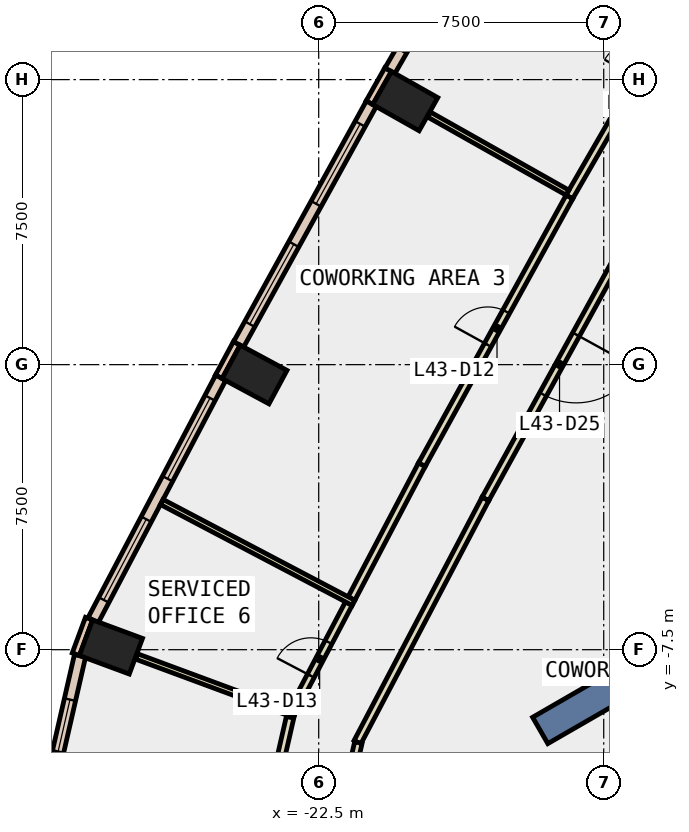
"""IFC4 building model, lengths in metres.
Left out: names, types, materials, properties, quantities, classifications, styles, units other than length and angle.
Written with IfcOpenShell. Run it as: python <this file> out.ifc"""

import sys

from ifc_helpers import new_model, si_unit, direction, frame, frame_2d, origin, origin_2d, place, context, subcontext, project, spatial, rectangle, extrude, element, fill, save


model = new_model("IFC4")
c1 = context("Model", 3, precision=1e-05, world=origin(), true_north=direction((0.0, 1.0)))
c2 = subcontext(c1, "Body", "Model", "MODEL_VIEW")
j1 = project(units=[si_unit("LENGTHUNIT", "METRE"), si_unit("PLANEANGLEUNIT", "RADIAN")], contexts=[c1])
p1 = place(None, origin())
s1 = spatial("IfcSite", under=j1, at=p1, CompositionType="ELEMENT")
p2 = place(p1, origin())
s2 = spatial("IfcBuilding", under=s1, at=p2, CompositionType="ELEMENT")
p3 = place(p2, frame((0.0, 0.0, 194.0)))
s3 = spatial("IfcBuildingStorey", under=s2, at=p3, CompositionType="ELEMENT", Elevation=194.0)
for number, where, z_axis, x_axis in (
    (1, (-20.222, 6.934, -0.4), (0.0, 0.0, 1.0), (0.491, 0.871, 0.0)),
    (2, (-24.188, -0.259, -0.4), (0.0, 0.0, 1.0), (0.474, 0.88, 0.0)),
    (3, (-27.967, -7.429, -0.4), (0.0, 0.0, 1.0), (0.347, 0.938, 0.0)),
):
    element("IfcColumn", number, at=place(p3, frame(where, z_axis=z_axis, x_axis=x_axis)), inside=s3, PredefinedType="COLUMN", context=c2, shape_type="SweptSolid", body=[
        extrude(rectangle(XDim=1.0, YDim=1.4, at=origin_2d()), origin(), (0.0, 0.0, 1.0), 4.2),
    ])
p4 = place(p3, frame((-8.877, -5.125, -0.4), z_axis=(0.0, 0.0, 1.0), x_axis=(-0.866017533419, -0.500013631625, 0.0)))
e4 = element("IfcWall", 4, at=p4, inside=s3, PredefinedType="SHEAR", context=c2, shape_type="SweptSolid", body=[
    extrude(rectangle(XDim=9.0, YDim=0.8, at=frame_2d((4.5, 0.0))), origin(), (0.0, 0.0, 1.0), 4.2),
])
p5 = place(p3, frame((-20.673, 7.762, 0.0), z_axis=(0.0, 0.0, 1.0), x_axis=(-0.491848119507, -0.870681013539, 0.0)))
e5 = element("IfcWall", 5, at=p5, inside=s3, PredefinedType="STANDARD", context=c2, shape_type="SweptSolid", body=[
    extrude(rectangle(XDim=1.0, YDim=0.2, at=frame_2d((0.5, 0.0))), origin(), (0.0, 0.0, 1.0), 3.8),
])
p6 = place(p3, frame((-24.655, 0.561, 0.0), z_axis=(0.0, 0.0, 1.0), x_axis=(-0.473663196434, -0.88070606694, 0.0)))
e6 = element("IfcWall", 6, at=p6, inside=s3, PredefinedType="STANDARD", context=c2, shape_type="SweptSolid", body=[
    extrude(rectangle(XDim=1.0, YDim=0.2, at=frame_2d((0.5, 0.0))), origin(), (0.0, 0.0, 1.0), 3.8),
])
p7 = place(p3, frame((-28.544, -6.683, 0.0), z_axis=(0.0, 0.0, 1.0), x_axis=(-0.347107644204, -0.937825294677, 0.0)))
e7 = element("IfcWall", 7, at=p7, inside=s3, PredefinedType="STANDARD", context=c2, shape_type="SweptSolid", body=[
    extrude(rectangle(XDim=1.0, YDim=0.2, at=frame_2d((0.5, 0.0))), origin(), (0.0, 0.0, 1.0), 3.8),
])
p8 = place(p3, frame((-17.011, 13.996, 0.0), z_axis=(0.0, 0.0, 1.0), x_axis=(-0.499948481376, -0.866055146033, 0.0)))
e8 = element("IfcWall", 8, at=p8, inside=s3, PredefinedType="STANDARD", context=c2, shape_type="SweptSolid", body=[
    extrude(rectangle(XDim=7.231, YDim=0.3, at=frame_2d((3.615, 0.0))), origin(), (0.0, 0.0, 1.0), 3.8),
])
p9 = place(p8, frame((0.608, 0.0, 0.9)))
e9 = element("IfcOpeningElement", 9, at=p9, cuts=e8, PredefinedType="OPENING", context=c2, shape_type="SweptSolid", body=[
    extrude(rectangle(XDim=2.4, YDim=2.6, at=frame_2d((1.2, 1.3))), frame((0.0, 0.16, 0.0), z_axis=(0.0, -1.0, 0.0), x_axis=(1.0, 0.0, 0.0)), (0.0, 0.0, 1.0), 0.32),
])
p10 = place(p8, frame((4.223, 0.0, 0.9)))
e10 = element("IfcOpeningElement", 10, at=p10, cuts=e8, PredefinedType="OPENING", context=c2, shape_type="SweptSolid", body=[
    extrude(rectangle(XDim=2.4, YDim=2.6, at=frame_2d((1.2, 1.3))), frame((0.0, 0.16, 0.0), z_axis=(0.0, -1.0, 0.0), x_axis=(1.0, 0.0, 0.0)), (0.0, 0.0, 1.0), 0.32),
])
p11 = place(p3, frame((-21.116, 6.865, 0.0), z_axis=(0.0, 0.0, 1.0), x_axis=(-0.482862185961, -0.875696356832, 0.0)))
e11 = element("IfcWall", 11, at=p11, inside=s3, PredefinedType="STANDARD", context=c2, shape_type="SweptSolid", body=[
    extrude(rectangle(XDim=7.23, YDim=0.3, at=frame_2d((3.615, 0.0))), origin(), (0.0, 0.0, 1.0), 3.8),
])
p12 = place(p11, frame((0.607, 0.0, 0.9)))
e12 = element("IfcOpeningElement", 12, at=p12, cuts=e11, PredefinedType="OPENING", context=c2, shape_type="SweptSolid", body=[
    extrude(rectangle(XDim=2.4, YDim=2.6, at=frame_2d((1.2, 1.3))), frame((0.0, 0.16, 0.0), z_axis=(0.0, -1.0, 0.0), x_axis=(1.0, 0.0, 0.0)), (0.0, 0.0, 1.0), 0.32),
])
p13 = place(p11, frame((4.222, 0.0, 0.9)))
e13 = element("IfcOpeningElement", 13, at=p13, cuts=e11, PredefinedType="OPENING", context=c2, shape_type="SweptSolid", body=[
    extrude(rectangle(XDim=2.4, YDim=2.6, at=frame_2d((1.2, 1.3))), frame((0.0, 0.16, 0.0), z_axis=(0.0, -1.0, 0.0), x_axis=(1.0, 0.0, 0.0)), (0.0, 0.0, 1.0), 0.32),
])
p14 = place(p3, frame((-25.08, -0.345, 0.0), z_axis=(0.0, 0.0, 1.0), x_axis=(-0.465478369088, -0.885059256723, 0.0)))
e14 = element("IfcWall", 14, at=p14, inside=s3, PredefinedType="STANDARD", context=c2, shape_type="SweptSolid", body=[
    extrude(rectangle(XDim=7.208, YDim=0.3, at=frame_2d((3.604, 0.0))), origin(), (0.0, 0.0, 1.0), 3.8),
])
p15 = place(p14, frame((0.602, 0.0, 0.9)))
e15 = element("IfcOpeningElement", 15, at=p15, cuts=e14, PredefinedType="OPENING", context=c2, shape_type="SweptSolid", body=[
    extrude(rectangle(XDim=2.4, YDim=2.6, at=frame_2d((1.2, 1.3))), frame((0.0, 0.16, 0.0), z_axis=(0.0, -1.0, 0.0), x_axis=(1.0, 0.0, 0.0)), (0.0, 0.0, 1.0), 0.32),
])
p16 = place(p14, frame((4.206, 0.0, 0.9)))
e16 = element("IfcOpeningElement", 16, at=p16, cuts=e14, PredefinedType="OPENING", context=c2, shape_type="SweptSolid", body=[
    extrude(rectangle(XDim=2.4, YDim=2.6, at=frame_2d((1.2, 1.3))), frame((0.0, 0.16, 0.0), z_axis=(0.0, -1.0, 0.0), x_axis=(1.0, 0.0, 0.0)), (0.0, 0.0, 1.0), 0.32),
])
p17 = place(p3, frame((-28.781, -7.66, 0.0), z_axis=(0.0, 0.0, 1.0), x_axis=(-0.223013094864, -0.974815448954, 0.0)))
e17 = element("IfcWall", 17, at=p17, inside=s3, PredefinedType="STANDARD", context=c2, shape_type="SweptSolid", body=[
    extrude(rectangle(XDim=3.767, YDim=0.3, at=frame_2d((1.884, 0.0))), origin(), (0.0, 0.0, 1.0), 3.8),
])
p18 = place(p17, frame((1.183, 0.0, 0.9)))
e18 = element("IfcOpeningElement", 18, at=p18, cuts=e17, PredefinedType="OPENING", context=c2, shape_type="SweptSolid", body=[
    extrude(rectangle(XDim=1.4, YDim=2.6, at=frame_2d((0.7, 1.3))), frame((0.0, 0.16, 0.0), z_axis=(0.0, -1.0, 0.0), x_axis=(1.0, 0.0, 0.0)), (0.0, 0.0, 1.0), 0.32),
])
p19 = place(p3, frame((-18.112, -3.531, 0.0), z_axis=(0.0, 0.0, 1.0), x_axis=(-0.465461327558, -0.885068219149, 0.0)))
e19 = element("IfcWall", 19, at=p19, inside=s3, PredefinedType="PARTITIONING", context=c2, shape_type="SweptSolid", body=[
    extrude(rectangle(XDim=7.236, YDim=0.2, at=frame_2d((3.618, 0.0))), origin(), (0.0, 0.0, 1.0), 3.8),
])
p20 = place(p3, frame((-21.456, -9.944, 0.0), z_axis=(0.0, 0.0, 1.0), x_axis=(-0.222871656966, -0.974847795567, 0.0)))
e20 = element("IfcWall", 20, at=p20, inside=s3, PredefinedType="PARTITIONING", context=c2, shape_type="SweptSolid", body=[
    extrude(rectangle(XDim=1.839, YDim=0.2, at=frame_2d((0.919, 0.0))), origin(), (0.0, 0.0, 1.0), 3.8),
])
p21 = place(p3, frame((-14.213, 3.543, 0.0), z_axis=(0.0, 0.0, 1.0), x_axis=(-0.482724934882, -0.875772023556, 0.0)))
e21 = element("IfcWall", 21, at=p21, inside=s3, PredefinedType="PARTITIONING", context=c2, shape_type="SweptSolid", body=[
    extrude(rectangle(XDim=8.077, YDim=0.2, at=frame_2d((4.039, 0.0))), origin(), (0.0, 0.0, 1.0), 3.8),
])
p22 = place(p21, frame((3.139, 0.0, 0.0)))
e22 = element("IfcOpeningElement", 22, at=p22, cuts=e21, PredefinedType="OPENING", context=c2, shape_type="SweptSolid", body=[
    extrude(rectangle(XDim=1.8, YDim=2.1, at=frame_2d((0.9, 1.05))), frame((0.0, 0.11, 0.0), z_axis=(0.0, -1.0, 0.0), x_axis=(1.0, 0.0, 0.0)), (0.0, 0.0, 1.0), 0.22),
])
p23 = place(p3, frame((-15.905, 4.412, 0.0), z_axis=(0.0, 0.0, 1.0), x_axis=(0.5000098125, 0.866019738461, 0.0)))
e23 = element("IfcWall", 23, at=p23, inside=s3, PredefinedType="PARTITIONING", context=c2, shape_type="SweptSolid", body=[
    extrude(rectangle(XDim=8.188, YDim=0.2, at=frame_2d((4.094, 0.0))), origin(), (0.0, 0.0, 1.0), 3.8),
])
p24 = place(p23, frame((3.594, 0.0, 0.0)))
e24 = element("IfcOpeningElement", 24, at=p24, cuts=e23, PredefinedType="OPENING", context=c2, shape_type="SweptSolid", body=[
    extrude(rectangle(XDim=1.0, YDim=2.1, at=frame_2d((0.5, 1.05))), frame((0.0, 0.11, 0.0), z_axis=(0.0, -1.0, 0.0), x_axis=(1.0, 0.0, 0.0)), (0.0, 0.0, 1.0), 0.22),
])
p25 = place(p3, frame((-21.638, -6.154, 0.0), z_axis=(0.0, 0.0, 1.0), x_axis=(0.465392595139, 0.885104362428, 0.0)))
e25 = element("IfcWall", 25, at=p25, inside=s3, PredefinedType="PARTITIONING", context=c2, shape_type="SweptSolid", body=[
    extrude(rectangle(XDim=3.982, YDim=0.2, at=frame_2d((1.991, 0.0))), origin(), (0.0, 0.0, 1.0), 3.8),
])
p26 = place(p3, frame((-19.785, -2.63, 0.0), z_axis=(0.0, 0.0, 1.0), x_axis=(0.482817232578, 0.875721142788, 0.0)))
e26 = element("IfcWall", 26, at=p26, inside=s3, PredefinedType="PARTITIONING", context=c2, shape_type="SweptSolid", body=[
    extrude(rectangle(XDim=8.04, YDim=0.2, at=frame_2d((4.02, 0.0))), origin(), (0.0, 0.0, 1.0), 3.8),
])
p27 = place(p26, frame((3.595, 0.0, 0.0)))
e27 = element("IfcOpeningElement", 27, at=p27, cuts=e26, PredefinedType="OPENING", context=c2, shape_type="SweptSolid", body=[
    extrude(rectangle(XDim=1.0, YDim=2.1, at=frame_2d((0.5, 1.05))), frame((0.0, 0.11, 0.0), z_axis=(0.0, -1.0, 0.0), x_axis=(1.0, 0.0, 0.0)), (0.0, 0.0, 1.0), 0.22),
])
p28 = place(p3, frame((-23.242, -9.204, 0.0), z_axis=(0.0, 0.0, 1.0), x_axis=(0.465431933571, 0.885083676955, 0.0)))
e28 = element("IfcWall", 28, at=p28, inside=s3, PredefinedType="PARTITIONING", context=c2, shape_type="SweptSolid", body=[
    extrude(rectangle(XDim=3.296, YDim=0.2, at=frame_2d((1.648, 0.0))), origin(), (0.0, 0.0, 1.0), 3.8),
])
p29 = place(p28, frame((1.148, 0.0, 0.0)))
e29 = element("IfcOpeningElement", 29, at=p29, cuts=e28, PredefinedType="OPENING", context=c2, shape_type="SweptSolid", body=[
    extrude(rectangle(XDim=1.0, YDim=2.1, at=frame_2d((0.5, 1.05))), frame((0.0, 0.11, 0.0), z_axis=(0.0, -1.0, 0.0), x_axis=(1.0, 0.0, 0.0)), (0.0, 0.0, 1.0), 0.22),
])
p30 = place(p3, frame((-23.826, -11.785, 0.0), z_axis=(0.0, 0.0, 1.0), x_axis=(0.222909903746, 0.974839050722, 0.0)))
e30 = element("IfcWall", 30, at=p30, inside=s3, PredefinedType="PARTITIONING", context=c2, shape_type="SweptSolid", body=[
    extrude(rectangle(XDim=2.571, YDim=0.2, at=frame_2d((1.285, 0.0))), origin(), (0.0, 0.0, 1.0), 3.8),
])
p31 = place(p3, frame((-15.954, 4.526, 0.0), z_axis=(0.0, 0.0, 1.0), x_axis=(-0.870940016277, 0.491389344663, 0.0)))
e31 = element("IfcWall", 31, at=p31, inside=s3, PredefinedType="PARTITIONING", context=c2, shape_type="SweptSolid", body=[
    extrude(rectangle(XDim=4.18, YDim=0.15, at=frame_2d((2.09, 0.0))), origin(), (0.0, 0.0, 1.0), 3.8),
])
p32 = place(p3, frame((-21.585, -6.267, 0.0), z_axis=(0.0, 0.0, 1.0), x_axis=(-0.885073333504, 0.465451602554, 0.0)))
e32 = element("IfcWall", 32, at=p32, inside=s3, PredefinedType="PARTITIONING", context=c2, shape_type="SweptSolid", body=[
    extrude(rectangle(XDim=5.7, YDim=0.15, at=frame_2d((2.85, 0.0))), origin(), (0.0, 0.0, 1.0), 3.8),
])
p33 = place(p3, frame((-23.137, -9.217, 0.0), z_axis=(0.0, 0.0, 1.0), x_axis=(-0.937808569806, 0.34715282859, 0.0)))
e33 = element("IfcWall", 33, at=p33, inside=s3, PredefinedType="PARTITIONING", context=c2, shape_type="SweptSolid", body=[
    extrude(rectangle(XDim=4.431, YDim=0.15, at=frame_2d((2.215, 0.0))), origin(), (0.0, 0.0, 1.0), 3.8),
])
p34 = place(p12, origin())
e34 = element("IfcWindow", 34, at=p34, inside=s3, PartitioningType="SINGLE_PANEL", PredefinedType="WINDOW", context=c2, shape_type="SweptSolid", body=[
    extrude(rectangle(XDim=2.4, YDim=2.6, at=frame_2d((1.2, 1.3))), frame((0.0, 0.03, 0.0), z_axis=(0.0, -1.0, 0.0), x_axis=(1.0, 0.0, 0.0)), (0.0, 0.0, 1.0), 0.06),
])
fill(e12, e34)
p35 = place(p13, origin())
e35 = element("IfcWindow", 35, at=p35, inside=s3, PartitioningType="SINGLE_PANEL", PredefinedType="WINDOW", context=c2, shape_type="SweptSolid", body=[
    extrude(rectangle(XDim=2.4, YDim=2.6, at=frame_2d((1.2, 1.3))), frame((0.0, 0.03, 0.0), z_axis=(0.0, -1.0, 0.0), x_axis=(1.0, 0.0, 0.0)), (0.0, 0.0, 1.0), 0.06),
])
fill(e13, e35)
p36 = place(p15, origin())
e36 = element("IfcWindow", 36, at=p36, inside=s3, PartitioningType="SINGLE_PANEL", PredefinedType="WINDOW", context=c2, shape_type="SweptSolid", body=[
    extrude(rectangle(XDim=2.4, YDim=2.6, at=frame_2d((1.2, 1.3))), frame((0.0, 0.03, 0.0), z_axis=(0.0, -1.0, 0.0), x_axis=(1.0, 0.0, 0.0)), (0.0, 0.0, 1.0), 0.06),
])
fill(e15, e36)
p37 = place(p16, origin())
e37 = element("IfcWindow", 37, at=p37, inside=s3, PartitioningType="SINGLE_PANEL", PredefinedType="WINDOW", context=c2, shape_type="SweptSolid", body=[
    extrude(rectangle(XDim=2.4, YDim=2.6, at=frame_2d((1.2, 1.3))), frame((0.0, 0.03, 0.0), z_axis=(0.0, -1.0, 0.0), x_axis=(1.0, 0.0, 0.0)), (0.0, 0.0, 1.0), 0.06),
])
fill(e16, e37)
p38 = place(p18, origin())
e38 = element("IfcWindow", 38, at=p38, inside=s3, PartitioningType="SINGLE_PANEL", PredefinedType="WINDOW", context=c2, shape_type="SweptSolid", body=[
    extrude(rectangle(XDim=1.4, YDim=2.6, at=frame_2d((0.7, 1.3))), frame((0.0, 0.03, 0.0), z_axis=(0.0, -1.0, 0.0), x_axis=(1.0, 0.0, 0.0)), (0.0, 0.0, 1.0), 0.06),
])
fill(e18, e38)
p39 = place(p27, origin())
e39 = element("IfcDoor", 39, at=p39, inside=s3, OperationType="SINGLE_SWING_LEFT", PredefinedType="DOOR", context=c2, shape_type="SweptSolid", body=[
    extrude(rectangle(XDim=1.0, YDim=2.1, at=frame_2d((0.5, 1.05))), frame((0.0, 0.025, 0.0), z_axis=(0.0, -1.0, 0.0), x_axis=(1.0, 0.0, 0.0)), (0.0, 0.0, 1.0), 0.05),
])
fill(e27, e39)
p40 = place(p29, origin())
e40 = element("IfcDoor", 40, at=p40, inside=s3, OperationType="SINGLE_SWING_RIGHT", PredefinedType="DOOR", context=c2, shape_type="SweptSolid", body=[
    extrude(rectangle(XDim=1.0, YDim=2.1, at=frame_2d((0.5, 1.05))), frame((0.0, 0.025, 0.0), z_axis=(0.0, -1.0, 0.0), x_axis=(1.0, 0.0, 0.0)), (0.0, 0.0, 1.0), 0.05),
])
fill(e29, e40)
p41 = place(p22, origin())
e41 = element("IfcDoor", 41, at=p41, inside=s3, OperationType="DOUBLE_DOOR_SINGLE_SWING", PredefinedType="DOOR", context=c2, shape_type="SweptSolid", body=[
    extrude(rectangle(XDim=1.8, YDim=2.1, at=frame_2d((0.9, 1.05))), frame((0.0, 0.025, 0.0), z_axis=(0.0, -1.0, 0.0), x_axis=(1.0, 0.0, 0.0)), (0.0, 0.0, 1.0), 0.05),
])
fill(e22, e41)
save(model, sys.argv[1])
